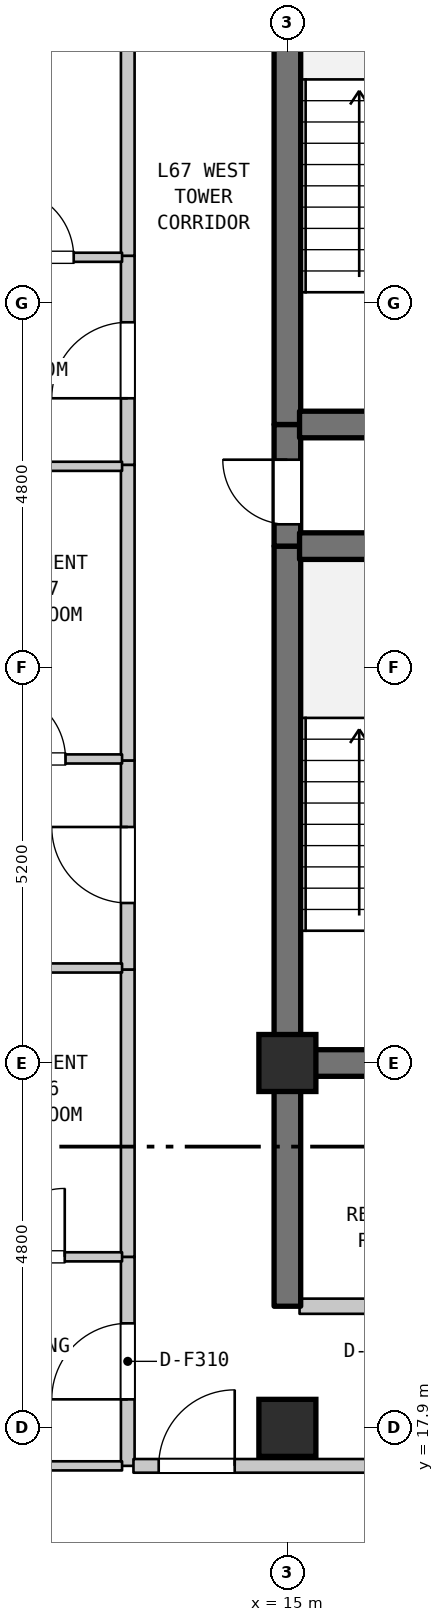
"""IFC4 building model, lengths in metres.
Left out: names, types, materials, properties, quantities, classifications, styles, units other than length and angle.
Written with IfcOpenShell. Run it as: python <this file> out.ifc"""

import sys

from ifc_helpers import new_model, si_unit, direction, frame, frame_2d, origin, origin_2d, place, context, subcontext, project, spatial, rectangle, extrude, element, fill, save


model = new_model("IFC4")
c1 = context("Model", 3, precision=1e-05, world=origin(), true_north=direction((0.0, 1.0)))
c2 = subcontext(c1, "Body", "Model", "MODEL_VIEW")
j1 = project(units=[si_unit("LENGTHUNIT", "METRE"), si_unit("PLANEANGLEUNIT", "RADIAN")], contexts=[c1])
p1 = place(None, origin())
s1 = spatial("IfcSite", under=j1, at=p1, CompositionType="ELEMENT")
p2 = place(p1, origin())
s2 = spatial("IfcBuilding", under=s1, at=p2, CompositionType="ELEMENT")
p3 = place(p2, frame((0.0, 0.0, 269.5)))
s3 = spatial("IfcBuildingStorey", under=s2, at=p3, CompositionType="ELEMENT", Elevation=269.5)
for number, where, z_axis, x_axis in (
    (1, (15.0, 17.9, 0.0), (0.0, 0.0, 1.0), (1.0, 0.0, 0.0)),
    (2, (15.0, 22.7, 0.0), (0.0, 0.0, 1.0), (1.0, 0.0, 0.0)),
):
    element("IfcColumn", number, at=place(p3, frame(where, z_axis=z_axis, x_axis=x_axis)), inside=s3, PredefinedType="COLUMN", context=c2, shape_type="SweptSolid", body=[
        extrude(rectangle(XDim=0.75, YDim=0.75, at=origin_2d()), origin(), (0.0, 0.0, 1.0), 3.7),
    ])
p4 = place(p3, frame((12.9, 17.4, 0.0), z_axis=(0.0, 0.0, 1.0), x_axis=(0.0, 1.0, 0.0)))
e3 = element("IfcWall", 3, at=p4, inside=s3, PredefinedType="STANDARD", context=c2, shape_type="SweptSolid", body=[
    extrude(rectangle(XDim=2.75, YDim=0.18, at=frame_2d((1.375, 0.0))), origin(), (0.0, 0.0, 1.0), 3.39),
])
p5 = place(p4, frame((0.875, 0.0, 0.0)))
e4 = element("IfcOpeningElement", 4, at=p5, cuts=e3, PredefinedType="OPENING", context=c2, shape_type="SweptSolid", body=[
    extrude(rectangle(XDim=1.0, YDim=2.15, at=frame_2d((0.5, 1.075))), frame((0.0, 0.1, 0.0), z_axis=(0.0, -1.0, 0.0), x_axis=(1.0, 0.0, 0.0)), (0.0, 0.0, 1.0), 0.2),
])
p6 = place(p3, frame((12.9, 20.15, 0.0), z_axis=(0.0, 0.0, 1.0), x_axis=(0.0, 1.0, 0.0)))
e5 = element("IfcWall", 5, at=p6, inside=s3, PredefinedType="STANDARD", context=c2, shape_type="SweptSolid", body=[
    extrude(rectangle(XDim=3.78, YDim=0.18, at=frame_2d((1.89, 0.0))), origin(), (0.0, 0.0, 1.0), 3.39),
])
p7 = place(p3, frame((12.9, 23.93, 0.0), z_axis=(0.0, 0.0, 1.0), x_axis=(0.0, 1.0, 0.0)))
e6 = element("IfcWall", 6, at=p7, inside=s3, PredefinedType="STANDARD", context=c2, shape_type="SweptSolid", body=[
    extrude(rectangle(XDim=2.75, YDim=0.18, at=frame_2d((1.375, 0.0))), origin(), (0.0, 0.0, 1.0), 3.39),
])
p8 = place(p7, frame((0.875, 0.0, 0.0)))
e7 = element("IfcOpeningElement", 7, at=p8, cuts=e6, PredefinedType="OPENING", context=c2, shape_type="SweptSolid", body=[
    extrude(rectangle(XDim=1.0, YDim=2.15, at=frame_2d((0.5, 1.075))), frame((0.0, 0.1, 0.0), z_axis=(0.0, -1.0, 0.0), x_axis=(1.0, 0.0, 0.0)), (0.0, 0.0, 1.0), 0.2),
])
p9 = place(p3, frame((12.9, 26.68, 0.0), z_axis=(0.0, 0.0, 1.0), x_axis=(0.0, 1.0, 0.0)))
e8 = element("IfcWall", 8, at=p9, inside=s3, PredefinedType="STANDARD", context=c2, shape_type="SweptSolid", body=[
    extrude(rectangle(XDim=3.89, YDim=0.18, at=frame_2d((1.945, 0.0))), origin(), (0.0, 0.0, 1.0), 3.39),
])
p10 = place(p3, frame((12.9, 30.57, 0.0), z_axis=(0.0, 0.0, 1.0), x_axis=(0.0, 1.0, 0.0)))
e9 = element("IfcWall", 9, at=p10, inside=s3, PredefinedType="STANDARD", context=c2, shape_type="SweptSolid", body=[
    extrude(rectangle(XDim=2.75, YDim=0.18, at=frame_2d((1.375, 0.0))), origin(), (0.0, 0.0, 1.0), 3.39),
])
p11 = place(p10, frame((0.875, 0.0, 0.0)))
e10 = element("IfcOpeningElement", 10, at=p11, cuts=e9, PredefinedType="OPENING", context=c2, shape_type="SweptSolid", body=[
    extrude(rectangle(XDim=1.0, YDim=2.15, at=frame_2d((0.5, 1.075))), frame((0.0, 0.1, 0.0), z_axis=(0.0, -1.0, 0.0), x_axis=(1.0, 0.0, 0.0)), (0.0, 0.0, 1.0), 0.2),
])
p12 = place(p3, frame((12.9, 33.32, 0.0), z_axis=(0.0, 0.0, 1.0), x_axis=(0.0, 1.0, 0.0)))
e11 = element("IfcWall", 11, at=p12, inside=s3, PredefinedType="STANDARD", context=c2, shape_type="SweptSolid", body=[
    extrude(rectangle(XDim=6.78, YDim=0.18, at=frame_2d((3.39, 0.0))), origin(), (0.0, 0.0, 1.0), 3.39),
])
p13 = place(p3, frame((15.0, 19.5, 0.0), z_axis=(0.0, 0.0, 1.0), x_axis=(0.0, 1.0, 0.0)))
e12 = element("IfcWall", 12, at=p13, inside=s3, PredefinedType="SHEAR", context=c2, shape_type="SweptSolid", body=[
    extrude(rectangle(XDim=3.2, YDim=0.35, at=frame_2d((1.6, 0.0))), origin(), (0.0, 0.0, 1.0), 3.39),
])
p14 = place(p3, frame((15.0, 22.7, 0.0), z_axis=(0.0, 0.0, 1.0), x_axis=(0.0, 1.0, 0.0)))
e13 = element("IfcWall", 13, at=p14, inside=s3, PredefinedType="SHEAR", context=c2, shape_type="SweptSolid", body=[
    extrude(rectangle(XDim=6.8, YDim=0.35, at=frame_2d((3.4, 0.0))), origin(), (0.0, 0.0, 1.0), 3.39),
])
p15 = place(p3, frame((15.0, 29.5, 0.0), z_axis=(0.0, 0.0, 1.0), x_axis=(0.0, 1.0, 0.0)))
e14 = element("IfcWall", 14, at=p15, inside=s3, PredefinedType="SHEAR", context=c2, shape_type="SweptSolid", body=[
    extrude(rectangle(XDim=1.6, YDim=0.35, at=frame_2d((0.8, 0.0))), origin(), (0.0, 0.0, 1.0), 3.39),
])
p16 = place(p15, frame((0.287, 0.0, 0.0)))
e15 = element("IfcOpeningElement", 15, at=p16, cuts=e14, PredefinedType="OPENING", context=c2, shape_type="SweptSolid", body=[
    extrude(rectangle(XDim=0.85, YDim=2.1, at=frame_2d((0.425, 1.05))), frame((0.0, 0.185, 0.0), z_axis=(0.0, -1.0, 0.0), x_axis=(1.0, 0.0, 0.0)), (0.0, 0.0, 1.0), 0.37),
])
p17 = place(p3, frame((15.0, 31.1, 0.0), z_axis=(0.0, 0.0, 1.0), x_axis=(0.0, 1.0, 0.0)))
e16 = element("IfcWall", 16, at=p17, inside=s3, PredefinedType="SHEAR", context=c2, shape_type="SweptSolid", body=[
    extrude(rectangle(XDim=6.8, YDim=0.35, at=frame_2d((3.4, 0.0))), origin(), (0.0, 0.0, 1.0), 3.39),
])
p18 = place(p3, frame((8.973, 17.4, 0.0), z_axis=(0.0, 0.0, 1.0), x_axis=(1.0, 0.0, 0.0)))
e17 = element("IfcWall", 17, at=p18, inside=s3, PredefinedType="PARTITIONING", context=c2, shape_type="SweptSolid", body=[
    extrude(rectangle(XDim=3.852, YDim=0.12, at=frame_2d((1.926, 0.0))), origin(), (0.0, 0.0, 1.0), 3.39),
])
p19 = place(p3, frame((12.975, 17.4, 0.0), z_axis=(0.0, 0.0, 1.0), x_axis=(1.0, 0.0, 0.0)))
e18 = element("IfcWall", 18, at=p19, inside=s3, PredefinedType="STANDARD", context=c2, shape_type="SweptSolid", body=[
    extrude(rectangle(XDim=3.18, YDim=0.18, at=frame_2d((1.59, 0.0))), origin(), (0.0, 0.0, 1.0), 3.39),
])
p20 = place(p19, frame((0.332, 0.0, 0.0)))
e19 = element("IfcOpeningElement", 19, at=p20, cuts=e18, PredefinedType="OPENING", context=c2, shape_type="SweptSolid", body=[
    extrude(rectangle(XDim=1.0, YDim=2.15, at=frame_2d((0.5, 1.075))), frame((0.0, 0.1, 0.0), z_axis=(0.0, -1.0, 0.0), x_axis=(1.0, 0.0, 0.0)), (0.0, 0.0, 1.0), 0.2),
])
p21 = place(p3, frame((15.16, 19.5, 0.0), z_axis=(0.0, 0.0, 1.0), x_axis=(1.0, 0.0, 0.0)))
e20 = element("IfcWall", 20, at=p21, inside=s3, PredefinedType="STANDARD", context=c2, shape_type="SweptSolid", body=[
    extrude(rectangle(XDim=3.68, YDim=0.2, at=frame_2d((1.84, 0.0))), origin(), (0.0, 0.0, 1.0), 3.39),
])
p22 = place(p21, frame((1.39, 0.0, 0.0)))
e21 = element("IfcOpeningElement", 21, at=p22, cuts=e20, PredefinedType="OPENING", context=c2, shape_type="SweptSolid", body=[
    extrude(rectangle(XDim=0.9, YDim=2.15, at=frame_2d((0.45, 1.075))), frame((0.0, 0.11, 0.0), z_axis=(0.0, -1.0, 0.0), x_axis=(1.0, 0.0, 0.0)), (0.0, 0.0, 1.0), 0.22),
])
p23 = place(p3, frame((10.53, 20.15, 0.0), z_axis=(0.0, 0.0, 1.0), x_axis=(1.0, 0.0, 0.0)))
e22 = element("IfcWall", 22, at=p23, inside=s3, PredefinedType="PARTITIONING", context=c2, shape_type="SweptSolid", body=[
    extrude(rectangle(XDim=2.295, YDim=0.12, at=frame_2d((1.147, 0.0))), origin(), (0.0, 0.0, 1.0), 3.39),
])
p24 = place(p23, frame((0.641, 0.0, 0.0)))
e23 = element("IfcOpeningElement", 23, at=p24, cuts=e22, PredefinedType="OPENING", context=c2, shape_type="SweptSolid", body=[
    extrude(rectangle(XDim=0.9, YDim=2.1, at=frame_2d((0.45, 1.05))), frame((0.0, 0.07, 0.0), z_axis=(0.0, -1.0, 0.0), x_axis=(1.0, 0.0, 0.0)), (0.0, 0.0, 1.0), 0.14),
])
p25 = place(p3, frame((15.16, 22.7, 0.0), z_axis=(0.0, 0.0, 1.0), x_axis=(1.0, 0.0, 0.0)))
e24 = element("IfcWall", 24, at=p25, inside=s3, PredefinedType="SHEAR", context=c2, shape_type="SweptSolid", body=[
    extrude(rectangle(XDim=3.68, YDim=0.35, at=frame_2d((1.84, 0.0))), origin(), (0.0, 0.0, 1.0), 3.39),
])
p26 = place(p3, frame((10.53, 23.95, 0.0), z_axis=(0.0, 0.0, 1.0), x_axis=(1.0, 0.0, 0.0)))
e25 = element("IfcWall", 25, at=p26, inside=s3, PredefinedType="PARTITIONING", context=c2, shape_type="SweptSolid", body=[
    extrude(rectangle(XDim=2.295, YDim=0.12, at=frame_2d((1.147, 0.0))), origin(), (0.0, 0.0, 1.0), 3.39),
])
p27 = place(p3, frame((10.548, 26.7, 0.0), z_axis=(0.0, 0.0, 1.0), x_axis=(1.0, 0.0, 0.0)))
e26 = element("IfcWall", 26, at=p27, inside=s3, PredefinedType="PARTITIONING", context=c2, shape_type="SweptSolid", body=[
    extrude(rectangle(XDim=2.277, YDim=0.12, at=frame_2d((1.138, 0.0))), origin(), (0.0, 0.0, 1.0), 3.39),
])
p28 = place(p27, frame((0.633, 0.0, 0.0)))
e27 = element("IfcOpeningElement", 27, at=p28, cuts=e26, PredefinedType="OPENING", context=c2, shape_type="SweptSolid", body=[
    extrude(rectangle(XDim=0.9, YDim=2.1, at=frame_2d((0.45, 1.05))), frame((0.0, 0.07, 0.0), z_axis=(0.0, -1.0, 0.0), x_axis=(1.0, 0.0, 0.0)), (0.0, 0.0, 1.0), 0.14),
])
p29 = place(p3, frame((15.16, 29.5, 0.0), z_axis=(0.0, 0.0, 1.0), x_axis=(1.0, 0.0, 0.0)))
e28 = element("IfcWall", 28, at=p29, inside=s3, PredefinedType="SHEAR", context=c2, shape_type="SweptSolid", body=[
    extrude(rectangle(XDim=3.68, YDim=0.35, at=frame_2d((1.84, 0.0))), origin(), (0.0, 0.0, 1.0), 3.39),
])
p30 = place(p3, frame((10.548, 30.55, 0.0), z_axis=(0.0, 0.0, 1.0), x_axis=(1.0, 0.0, 0.0)))
e29 = element("IfcWall", 29, at=p30, inside=s3, PredefinedType="PARTITIONING", context=c2, shape_type="SweptSolid", body=[
    extrude(rectangle(XDim=2.277, YDim=0.12, at=frame_2d((1.138, 0.0))), origin(), (0.0, 0.0, 1.0), 3.39),
])
p31 = place(p3, frame((15.16, 31.1, 0.0), z_axis=(0.0, 0.0, 1.0), x_axis=(1.0, 0.0, 0.0)))
e30 = element("IfcWall", 30, at=p31, inside=s3, PredefinedType="SHEAR", context=c2, shape_type="SweptSolid", body=[
    extrude(rectangle(XDim=3.68, YDim=0.35, at=frame_2d((1.84, 0.0))), origin(), (0.0, 0.0, 1.0), 3.39),
])
p32 = place(p3, frame((10.623, 33.3, 0.0), z_axis=(0.0, 0.0, 1.0), x_axis=(1.0, 0.0, 0.0)))
e31 = element("IfcWall", 31, at=p32, inside=s3, PredefinedType="PARTITIONING", context=c2, shape_type="SweptSolid", body=[
    extrude(rectangle(XDim=2.202, YDim=0.12, at=frame_2d((1.101, 0.0))), origin(), (0.0, 0.0, 1.0), 3.39),
])
p33 = place(p32, frame((0.666, 0.0, 0.0)))
e32 = element("IfcOpeningElement", 32, at=p33, cuts=e31, PredefinedType="OPENING", context=c2, shape_type="SweptSolid", body=[
    extrude(rectangle(XDim=0.9, YDim=2.1, at=frame_2d((0.45, 1.05))), frame((0.0, 0.07, 0.0), z_axis=(0.0, -1.0, 0.0), x_axis=(1.0, 0.0, 0.0)), (0.0, 0.0, 1.0), 0.14),
])
p34 = place(p5, origin())
e33 = element("IfcDoor", 33, at=p34, inside=s3, OperationType="SINGLE_SWING_LEFT", PredefinedType="DOOR", context=c2, shape_type="SweptSolid", body=[
    extrude(rectangle(XDim=1.0, YDim=2.15, at=frame_2d((0.5, 1.075))), frame((0.0, 0.025, 0.0), z_axis=(0.0, -1.0, 0.0), x_axis=(1.0, 0.0, 0.0)), (0.0, 0.0, 1.0), 0.05),
])
fill(e4, e33)
p35 = place(p8, origin())
e34 = element("IfcDoor", 34, at=p35, inside=s3, OperationType="SINGLE_SWING_RIGHT", PredefinedType="DOOR", context=c2, shape_type="SweptSolid", body=[
    extrude(rectangle(XDim=1.0, YDim=2.15, at=frame_2d((0.5, 1.075))), frame((0.0, 0.025, 0.0), z_axis=(0.0, -1.0, 0.0), x_axis=(1.0, 0.0, 0.0)), (0.0, 0.0, 1.0), 0.05),
])
fill(e7, e34)
p36 = place(p11, origin())
e35 = element("IfcDoor", 35, at=p36, inside=s3, OperationType="SINGLE_SWING_LEFT", PredefinedType="DOOR", context=c2, shape_type="SweptSolid", body=[
    extrude(rectangle(XDim=1.0, YDim=2.15, at=frame_2d((0.5, 1.075))), frame((0.0, 0.025, 0.0), z_axis=(0.0, -1.0, 0.0), x_axis=(1.0, 0.0, 0.0)), (0.0, 0.0, 1.0), 0.05),
])
fill(e10, e35)
p37 = place(p16, origin())
e36 = element("IfcDoor", 36, at=p37, inside=s3, OperationType="SINGLE_SWING_RIGHT", PredefinedType="DOOR", context=c2, shape_type="SweptSolid", body=[
    extrude(rectangle(XDim=0.85, YDim=2.1, at=frame_2d((0.425, 1.05))), frame((0.0, 0.025, 0.0), z_axis=(0.0, -1.0, 0.0), x_axis=(1.0, 0.0, 0.0)), (0.0, 0.0, 1.0), 0.05),
])
fill(e15, e36)
p38 = place(p20, origin())
e37 = element("IfcDoor", 37, at=p38, inside=s3, OperationType="SINGLE_SWING_RIGHT", PredefinedType="DOOR", context=c2, shape_type="SweptSolid", body=[
    extrude(rectangle(XDim=1.0, YDim=2.15, at=frame_2d((0.5, 1.075))), frame((0.0, 0.025, 0.0), z_axis=(0.0, -1.0, 0.0), x_axis=(1.0, 0.0, 0.0)), (0.0, 0.0, 1.0), 0.05),
])
fill(e19, e37)
p39 = place(p24, origin())
e38 = element("IfcDoor", 38, at=p39, inside=s3, OperationType="SINGLE_SWING_RIGHT", PredefinedType="DOOR", context=c2, shape_type="SweptSolid", body=[
    extrude(rectangle(XDim=0.9, YDim=2.1, at=frame_2d((0.45, 1.05))), frame((0.0, 0.025, 0.0), z_axis=(0.0, -1.0, 0.0), x_axis=(1.0, 0.0, 0.0)), (0.0, 0.0, 1.0), 0.05),
])
fill(e23, e38)
p40 = place(p28, origin())
e39 = element("IfcDoor", 39, at=p40, inside=s3, OperationType="SINGLE_SWING_LEFT", PredefinedType="DOOR", context=c2, shape_type="SweptSolid", body=[
    extrude(rectangle(XDim=0.9, YDim=2.1, at=frame_2d((0.45, 1.05))), frame((0.0, 0.025, 0.0), z_axis=(0.0, -1.0, 0.0), x_axis=(1.0, 0.0, 0.0)), (0.0, 0.0, 1.0), 0.05),
])
fill(e27, e39)
p41 = place(p33, origin())
e40 = element("IfcDoor", 40, at=p41, inside=s3, OperationType="SINGLE_SWING_LEFT", PredefinedType="DOOR", context=c2, shape_type="SweptSolid", body=[
    extrude(rectangle(XDim=0.9, YDim=2.1, at=frame_2d((0.45, 1.05))), frame((0.0, 0.025, 0.0), z_axis=(0.0, -1.0, 0.0), x_axis=(1.0, 0.0, 0.0)), (0.0, 0.0, 1.0), 0.05),
])
fill(e32, e40)
save(model, sys.argv[1])
